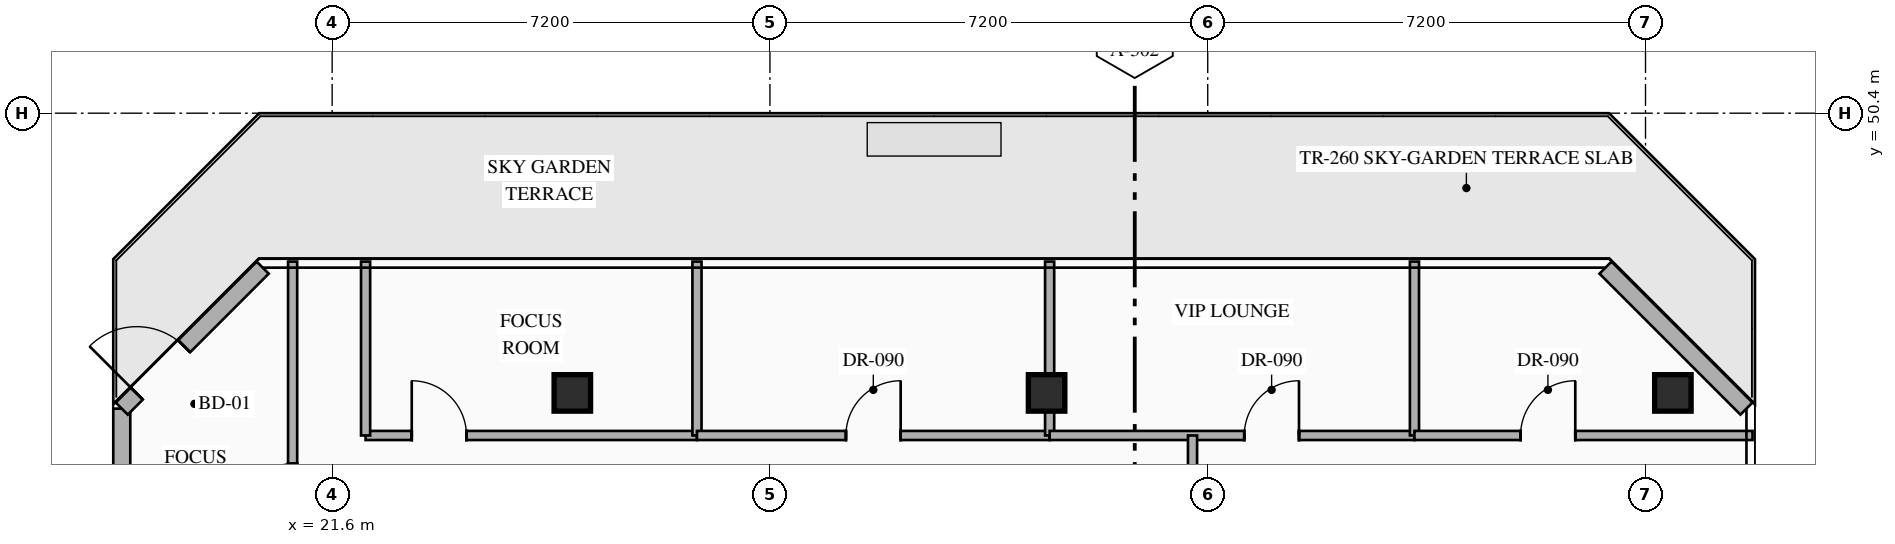
"""IFC4 building model, lengths in metres.
Left out: names, types, materials, properties, quantities, classifications, styles, units other than length and angle.
Written with IfcOpenShell. Run it as: python <this file> out.ifc"""

import sys

from ifc_helpers import new_model, si_unit, direction, frame, frame_2d, origin, origin_2d, place, context, subcontext, project, spatial, rectangle, hollow_rectangle, extrude, element, fill, save


model = new_model("IFC4")
c1 = context("Model", 3, precision=1e-05, world=origin(), true_north=direction((0.0, 1.0)))
c2 = subcontext(c1, "Body", "Model", "MODEL_VIEW")
j1 = project(units=[si_unit("LENGTHUNIT", "METRE"), si_unit("PLANEANGLEUNIT", "RADIAN")], contexts=[c1])
p1 = place(None, origin())
s1 = spatial("IfcSite", under=j1, at=p1, CompositionType="ELEMENT")
p2 = place(p1, origin())
s2 = spatial("IfcBuilding", under=s1, at=p2, CompositionType="ELEMENT")
p3 = place(p2, frame((0.0, 0.0, 265.95)))
s3 = spatial("IfcBuildingStorey", under=s2, at=p3, CompositionType="ELEMENT", Elevation=265.95)
for number, where, z_axis, x_axis in (
    (1, (25.55, 45.8, 0.0), (0.0, 0.0, 1.0), (1.0, 0.0, 0.0)),
    (2, (33.35, 45.8, 0.0), (0.0, 0.0, 1.0), (1.0, 0.0, 0.0)),
    (3, (43.65, 45.8, 0.0), (0.0, 0.0, 1.0), (1.0, 0.0, 0.0)),
):
    element("IfcColumn", number, at=place(p3, frame(where, z_axis=z_axis, x_axis=x_axis)), inside=s3, PredefinedType="COLUMN", context=c2, shape_type="SweptSolid", body=[
        extrude(hollow_rectangle(XDim=0.6, YDim=0.6, WallThickness=0.025, at=origin_2d()), origin(), (0.0, 0.0, 1.0), 4.0),
    ])
p4 = place(p3, frame((18.14, 25.858, 0.0), z_axis=(0.0, 0.0, 1.0), x_axis=(0.0, 1.0, 0.0)))
e4 = element("IfcWall", 4, at=p4, inside=s3, PredefinedType="STANDARD", context=c2, shape_type="SweptSolid", body=[
    extrude(rectangle(XDim=19.684, YDim=0.28, at=frame_2d((9.842, 0.0))), origin(), (0.0, 0.0, 1.0), 3.75),
])
p5 = place(p4, frame((5.237, 0.0, 0.0)))
e5 = element("IfcOpeningElement", 5, at=p5, cuts=e4, PredefinedType="OPENING", context=c2, shape_type="SweptSolid", body=[
    extrude(rectangle(XDim=1.8, YDim=2.25, at=frame_2d((0.9, 1.125))), frame((0.0, 0.15, 0.0), z_axis=(0.0, -1.0, 0.0), x_axis=(1.0, 0.0, 0.0)), (0.0, 0.0, 1.0), 0.3),
])
p6 = place(p3, frame((18.14, 45.542, 0.0), z_axis=(0.0, 0.0, 1.0), x_axis=(0.707106781187, 0.707106781187, 0.0)))
e6 = element("IfcWall", 6, at=p6, inside=s3, PredefinedType="STANDARD", context=c2, shape_type="SweptSolid", body=[
    extrude(rectangle(XDim=3.278, YDim=0.28, at=frame_2d((1.639, 0.0))), origin(), (0.0, 0.0, 1.0), 3.75),
])
p7 = place(p6, frame((0.35, 0.0, 0.0)))
e7 = element("IfcOpeningElement", 7, at=p7, cuts=e6, PredefinedType="OPENING", context=c2, shape_type="SweptSolid", body=[
    extrude(rectangle(XDim=1.1, YDim=2.2, at=frame_2d((0.55, 1.1))), frame((0.0, 0.15, 0.0), z_axis=(0.0, -1.0, 0.0), x_axis=(1.0, 0.0, 0.0)), (0.0, 0.0, 1.0), 0.3),
])
p8 = place(p3, frame((42.542, 47.86, 0.0), z_axis=(0.0, 0.0, 1.0), x_axis=(0.707106781187, -0.707106781187, 0.0)))
e8 = element("IfcWall", 8, at=p8, inside=s3, PredefinedType="STANDARD", context=c2, shape_type="SweptSolid", body=[
    extrude(rectangle(XDim=3.278, YDim=0.28, at=frame_2d((1.639, 0.0))), origin(), (0.0, 0.0, 1.0), 3.75),
])
p9 = place(p3, frame((22.15, 45.1, 0.0), z_axis=(0.0, 0.0, 1.0), x_axis=(1.0, 0.0, 0.0)))
e9 = element("IfcWall", 9, at=p9, inside=s3, PredefinedType="PARTITIONING", context=c2, shape_type="SweptSolid", body=[
    extrude(rectangle(XDim=5.45, YDim=0.15, at=frame_2d((2.725, 0.0))), origin(), (0.0, 0.0, 1.0), 3.75),
])
p10 = place(p9, frame((0.759, 0.0, 0.0)))
e10 = element("IfcOpeningElement", 10, at=p10, cuts=e9, PredefinedType="OPENING", context=c2, shape_type="SweptSolid", body=[
    extrude(rectangle(XDim=0.9, YDim=2.15, at=frame_2d((0.45, 1.075))), frame((0.0, 0.085, 0.0), z_axis=(0.0, -1.0, 0.0), x_axis=(1.0, 0.0, 0.0)), (0.0, 0.0, 1.0), 0.17),
])
for number, where, z_axis, x_axis in (
    (11, (22.15, 45.1, 0.0), (0.0, 0.0, 1.0), (0.0, 1.0, 0.0)),
    (12, (27.6, 45.1, 0.0), (0.0, 0.0, 1.0), (0.0, 1.0, 0.0)),
):
    element("IfcWall", number, at=place(p3, frame(where, z_axis=z_axis, x_axis=x_axis)), inside=s3, PredefinedType="PARTITIONING", context=c2, shape_type="SweptSolid", body=[
        extrude(rectangle(XDim=2.86, YDim=0.15, at=frame_2d((1.43, 0.0))), origin(), (0.0, 0.0, 1.0), 3.75),
    ])
p11 = place(p3, frame((27.6, 45.1, 0.0), z_axis=(0.0, 0.0, 1.0), x_axis=(1.0, 0.0, 0.0)))
e13 = element("IfcWall", 13, at=p11, inside=s3, PredefinedType="PARTITIONING", context=c2, shape_type="SweptSolid", body=[
    extrude(rectangle(XDim=5.8, YDim=0.15, at=frame_2d((2.9, 0.0))), origin(), (0.0, 0.0, 1.0), 3.75),
])
p12 = place(p11, frame((2.45, 0.0, 0.0)))
e14 = element("IfcOpeningElement", 14, at=p12, cuts=e13, PredefinedType="OPENING", context=c2, shape_type="SweptSolid", body=[
    extrude(rectangle(XDim=0.9, YDim=2.15, at=frame_2d((0.45, 1.075))), frame((0.0, 0.085, 0.0), z_axis=(0.0, -1.0, 0.0), x_axis=(1.0, 0.0, 0.0)), (0.0, 0.0, 1.0), 0.17),
])
p13 = place(p3, frame((33.4, 45.1, 0.0), z_axis=(0.0, 0.0, 1.0), x_axis=(0.0, 1.0, 0.0)))
e15 = element("IfcWall", 15, at=p13, inside=s3, PredefinedType="PARTITIONING", context=c2, shape_type="SweptSolid", body=[
    extrude(rectangle(XDim=2.86, YDim=0.15, at=frame_2d((1.43, 0.0))), origin(), (0.0, 0.0, 1.0), 3.245),
])
p14 = place(p3, frame((33.4, 45.1, 0.0), z_axis=(0.0, 0.0, 1.0), x_axis=(1.0, 0.0, 0.0)))
e16 = element("IfcWall", 16, at=p14, inside=s3, PredefinedType="PARTITIONING", context=c2, shape_type="SweptSolid", body=[
    extrude(rectangle(XDim=6.0, YDim=0.15, at=frame_2d((3.0, 0.0))), origin(), (0.0, 0.0, 1.0), 3.75),
])
p15 = place(p14, frame((3.201, 0.0, 0.0)))
e17 = element("IfcOpeningElement", 17, at=p15, cuts=e16, PredefinedType="OPENING", context=c2, shape_type="SweptSolid", body=[
    extrude(rectangle(XDim=0.9, YDim=2.15, at=frame_2d((0.45, 1.075))), frame((0.0, 0.085, 0.0), z_axis=(0.0, -1.0, 0.0), x_axis=(1.0, 0.0, 0.0)), (0.0, 0.0, 1.0), 0.17),
])
p16 = place(p3, frame((39.4, 45.1, 0.0), z_axis=(0.0, 0.0, 1.0), x_axis=(0.0, 1.0, 0.0)))
e18 = element("IfcWall", 18, at=p16, inside=s3, PredefinedType="PARTITIONING", context=c2, shape_type="SweptSolid", body=[
    extrude(rectangle(XDim=2.86, YDim=0.15, at=frame_2d((1.43, 0.0))), origin(), (0.0, 0.0, 1.0), 3.75),
])
p17 = place(p3, frame((39.4, 45.1, 0.0), z_axis=(0.0, 0.0, 1.0), x_axis=(1.0, 0.0, 0.0)))
e19 = element("IfcWall", 19, at=p17, inside=s3, PredefinedType="PARTITIONING", context=c2, shape_type="SweptSolid", body=[
    extrude(rectangle(XDim=5.56, YDim=0.15, at=frame_2d((2.78, 0.0))), origin(), (0.0, 0.0, 1.0), 3.75),
])
p18 = place(p17, frame((1.745, 0.0, 0.0)))
e20 = element("IfcOpeningElement", 20, at=p18, cuts=e19, PredefinedType="OPENING", context=c2, shape_type="SweptSolid", body=[
    extrude(rectangle(XDim=0.9, YDim=2.15, at=frame_2d((0.45, 1.075))), frame((0.0, 0.085, 0.0), z_axis=(0.0, -1.0, 0.0), x_axis=(1.0, 0.0, 0.0)), (0.0, 0.0, 1.0), 0.17),
])
p19 = place(p3, frame((35.75, 42.48, 0.0), z_axis=(0.0, 0.0, 1.0), x_axis=(0.0, 1.0, 0.0)))
e21 = element("IfcWall", 21, at=p19, inside=s3, PredefinedType="PARTITIONING", context=c2, shape_type="SweptSolid", body=[
    extrude(rectangle(XDim=2.62, YDim=0.15, at=frame_2d((1.31, 0.0))), origin(), (0.0, 0.0, 1.0), 3.75),
])
p20 = place(p19, frame((0.86, 0.0, 0.0)))
e22 = element("IfcOpeningElement", 22, at=p20, cuts=e21, PredefinedType="OPENING", context=c2, shape_type="SweptSolid", body=[
    extrude(rectangle(XDim=0.9, YDim=2.15, at=frame_2d((0.45, 1.075))), frame((0.0, 0.085, 0.0), z_axis=(0.0, -1.0, 0.0), x_axis=(1.0, 0.0, 0.0)), (0.0, 0.0, 1.0), 0.17),
])
p21 = place(p3, frame((20.95, 43.2, 0.0), z_axis=(0.0, 0.0, 1.0), x_axis=(0.0, 1.0, 0.0)))
e23 = element("IfcWall", 23, at=p21, inside=s3, PredefinedType="PARTITIONING", context=c2, shape_type="SweptSolid", body=[
    extrude(rectangle(XDim=4.76, YDim=0.15, at=frame_2d((2.38, 0.0))), origin(), (0.0, 0.0, 1.0), 3.75),
])
p22 = place(p21, frame((0.535, 0.0, 0.0)))
e24 = element("IfcOpeningElement", 24, at=p22, cuts=e23, PredefinedType="OPENING", context=c2, shape_type="SweptSolid", body=[
    extrude(rectangle(XDim=0.9, YDim=2.15, at=frame_2d((0.45, 1.075))), frame((0.0, 0.085, 0.0), z_axis=(0.0, -1.0, 0.0), x_axis=(1.0, 0.0, 0.0)), (0.0, 0.0, 1.0), 0.17),
])
p23 = place(p7, origin())
e25 = element("IfcDoor", 25, at=p23, inside=s3, OperationType="SINGLE_SWING_LEFT", PredefinedType="DOOR", context=c2, shape_type="SweptSolid", body=[
    extrude(rectangle(XDim=1.1, YDim=2.2, at=frame_2d((0.55, 1.1))), frame((0.0, 0.025, 0.0), z_axis=(0.0, -1.0, 0.0), x_axis=(1.0, 0.0, 0.0)), (0.0, 0.0, 1.0), 0.05),
])
fill(e7, e25)
p24 = place(p10, origin())
e26 = element("IfcDoor", 26, at=p24, inside=s3, OperationType="SINGLE_SWING_LEFT", PredefinedType="DOOR", context=c2, shape_type="SweptSolid", body=[
    extrude(rectangle(XDim=0.9, YDim=2.15, at=frame_2d((0.45, 1.075))), frame((0.0, 0.025, 0.0), z_axis=(0.0, -1.0, 0.0), x_axis=(1.0, 0.0, 0.0)), (0.0, 0.0, 1.0), 0.05),
])
fill(e10, e26)
p25 = place(p12, origin())
e27 = element("IfcDoor", 27, at=p25, inside=s3, OperationType="SINGLE_SWING_RIGHT", PredefinedType="DOOR", context=c2, shape_type="SweptSolid", body=[
    extrude(rectangle(XDim=0.9, YDim=2.15, at=frame_2d((0.45, 1.075))), frame((0.0, 0.025, 0.0), z_axis=(0.0, -1.0, 0.0), x_axis=(1.0, 0.0, 0.0)), (0.0, 0.0, 1.0), 0.05),
])
fill(e14, e27)
p26 = place(p15, origin())
e28 = element("IfcDoor", 28, at=p26, inside=s3, OperationType="SINGLE_SWING_RIGHT", PredefinedType="DOOR", context=c2, shape_type="SweptSolid", body=[
    extrude(rectangle(XDim=0.9, YDim=2.15, at=frame_2d((0.45, 1.075))), frame((0.0, 0.025, 0.0), z_axis=(0.0, -1.0, 0.0), x_axis=(1.0, 0.0, 0.0)), (0.0, 0.0, 1.0), 0.05),
])
fill(e17, e28)
p27 = place(p18, origin())
e29 = element("IfcDoor", 29, at=p27, inside=s3, OperationType="SINGLE_SWING_RIGHT", PredefinedType="DOOR", context=c2, shape_type="SweptSolid", body=[
    extrude(rectangle(XDim=0.9, YDim=2.15, at=frame_2d((0.45, 1.075))), frame((0.0, 0.025, 0.0), z_axis=(0.0, -1.0, 0.0), x_axis=(1.0, 0.0, 0.0)), (0.0, 0.0, 1.0), 0.05),
])
fill(e20, e29)
p28 = place(p22, origin())
e30 = element("IfcDoor", 30, at=p28, inside=s3, OperationType="SINGLE_SWING_LEFT", PredefinedType="DOOR", context=c2, shape_type="SweptSolid", body=[
    extrude(rectangle(XDim=0.9, YDim=2.15, at=frame_2d((0.45, 1.075))), frame((0.0, 0.025, 0.0), z_axis=(0.0, -1.0, 0.0), x_axis=(1.0, 0.0, 0.0)), (0.0, 0.0, 1.0), 0.05),
])
fill(e24, e30)
save(model, sys.argv[1])
